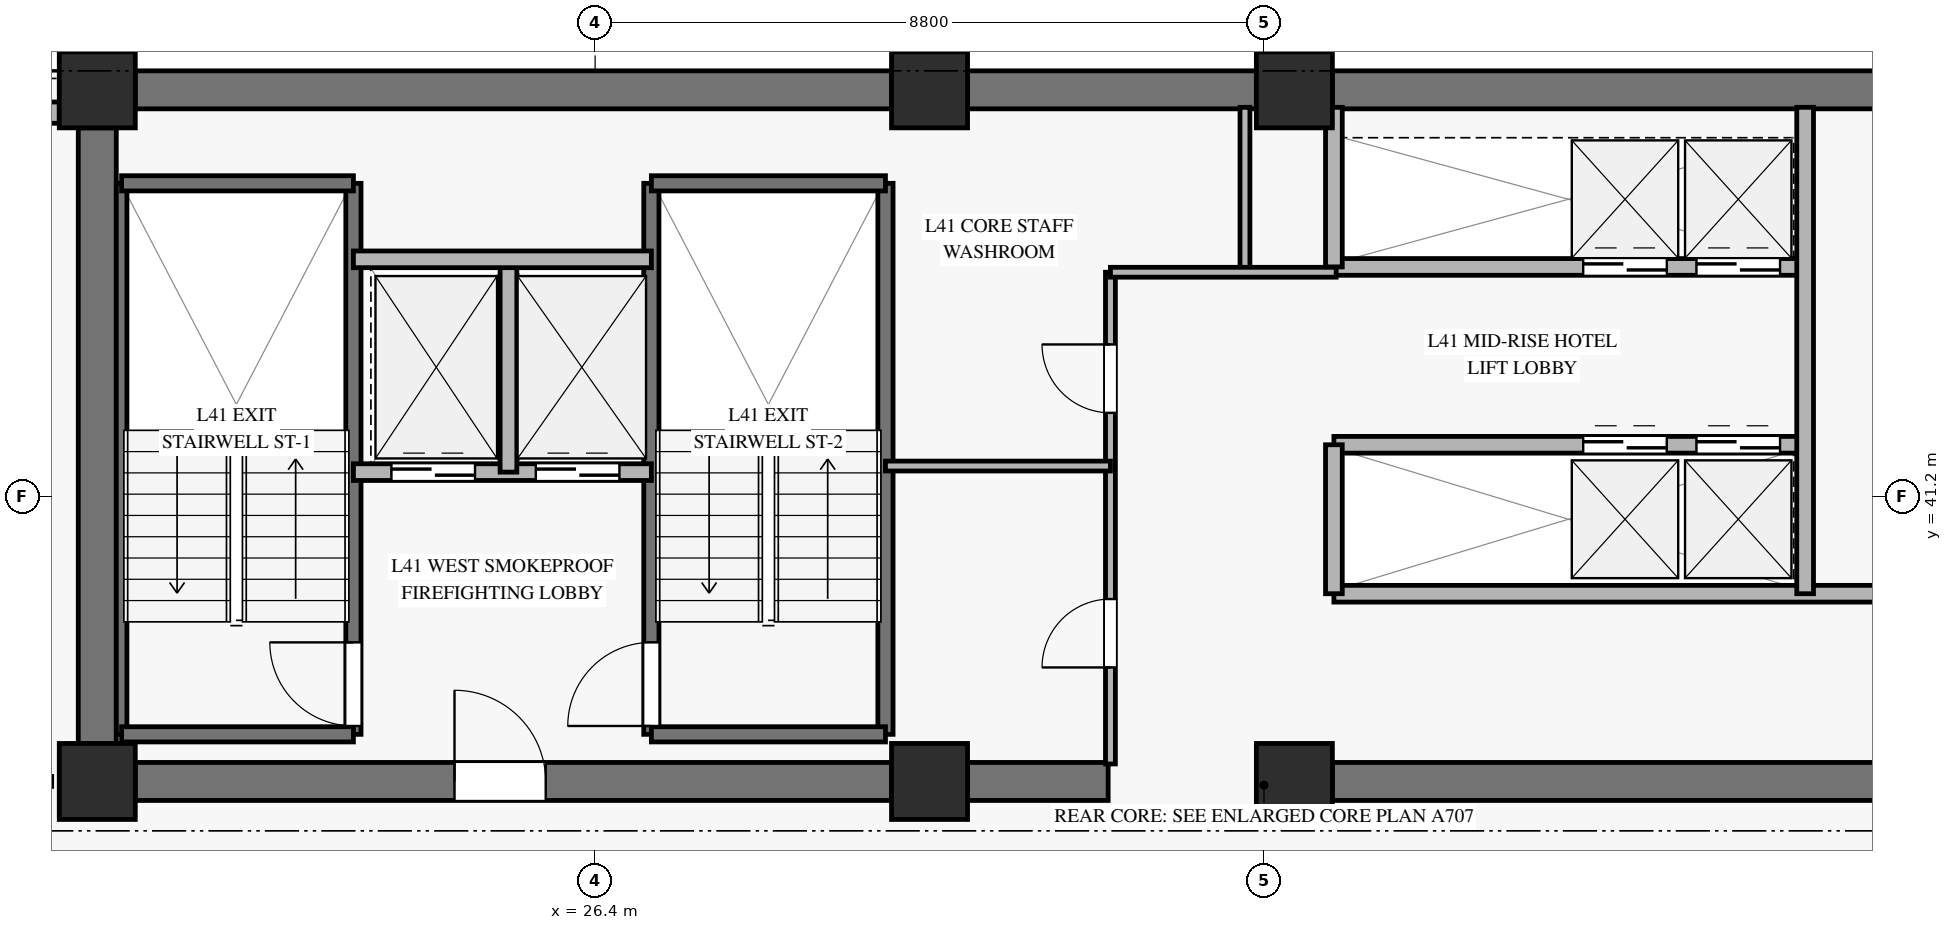
"""IFC4 building model, lengths in metres.
Left out: names, types, materials, properties, quantities, classifications, styles, units other than length and angle.
Written with IfcOpenShell. Run it as: python <this file> out.ifc"""

import sys

from ifc_helpers import new_model, si_unit, direction, frame, frame_2d, origin, origin_2d, place, context, subcontext, project, spatial, rectangle, extrude, source, transform, mapped, element, fill, save


model = new_model("IFC4")
c1 = context("Model", 3, precision=1e-05, world=origin(), true_north=direction((0.0, 1.0)))
c2 = subcontext(c1, "Body", "Model", "MODEL_VIEW")
j1 = project(units=[si_unit("LENGTHUNIT", "METRE"), si_unit("PLANEANGLEUNIT", "RADIAN")], contexts=[c1])
p1 = place(None, origin())
s1 = spatial("IfcSite", under=j1, at=p1, CompositionType="ELEMENT")
p2 = place(p1, origin())
s2 = spatial("IfcBuilding", under=s1, at=p2, CompositionType="ELEMENT")
p3 = place(p2, frame((0.0, 0.0, 166.7)))
s3 = spatial("IfcBuildingStorey", under=s2, at=p3, CompositionType="ELEMENT", Elevation=166.7)
m1 = source(origin(), c2, "Body", "SweptSolid", [
    extrude(rectangle(XDim=1.0, YDim=1.0, at=origin_2d()), origin(), (0.0, 0.0, 1.0), 3.27),
])
for number, where, z_axis, x_axis in (
    (1, (19.85, 37.45, 0.0), (0.0, 0.0, 1.0), (1.0, 0.0, 0.0)),
    (2, (19.85, 46.55, 0.0), (0.0, 0.0, 1.0), (1.0, 0.0, 0.0)),
    (3, (30.8, 37.45, 0.0), (0.0, 0.0, 1.0), (1.0, 0.0, 0.0)),
    (4, (30.8, 46.55, 0.0), (0.0, 0.0, 1.0), (1.0, 0.0, 0.0)),
    (5, (35.6, 37.45, 0.0), (0.0, 0.0, 1.0), (1.0, 0.0, 0.0)),
    (6, (35.6, 46.55, 0.0), (0.0, 0.0, 1.0), (1.0, 0.0, 0.0)),
):
    element("IfcColumn", number, at=place(p3, frame(where, z_axis=z_axis, x_axis=x_axis)), inside=s3, PredefinedType="PILASTER", context=c2, shape_type="MappedRepresentation", body=[
        mapped(m1, transform((0.0, 0.0, 0.0), x_axis=(1.0, 0.0, 0.0), y_axis=(0.0, 1.0, 0.0), z_axis=(0.0, 0.0, 1.0), scale=1.0)),
    ])
p4 = place(p3, frame((20.35, 46.55, 0.0), z_axis=(0.0, 0.0, 1.0), x_axis=(1.0, 0.0, 0.0)))
e7 = element("IfcWall", 7, at=p4, inside=s3, PredefinedType="SHEAR", context=c2, shape_type="SweptSolid", body=[
    extrude(rectangle(XDim=9.95, YDim=0.5, at=frame_2d((4.975, 0.0))), origin(), (0.0, 0.0, 1.0), 3.27),
])
p5 = place(p3, frame((31.3, 46.55, 0.0), z_axis=(0.0, 0.0, 1.0), x_axis=(1.0, 0.0, 0.0)))
e8 = element("IfcWall", 8, at=p5, inside=s3, PredefinedType="SHEAR", context=c2, shape_type="SweptSolid", body=[
    extrude(rectangle(XDim=3.8, YDim=0.5, at=frame_2d((1.9, 0.0))), origin(), (0.0, 0.0, 1.0), 3.27),
])
p6 = place(p3, frame((36.1, 46.55, 0.0), z_axis=(0.0, 0.0, 1.0), x_axis=(1.0, 0.0, 0.0)))
e9 = element("IfcWall", 9, at=p6, inside=s3, PredefinedType="SHEAR", context=c2, shape_type="SweptSolid", body=[
    extrude(rectangle(XDim=7.7, YDim=0.5, at=frame_2d((3.85, 0.0))), origin(), (0.0, 0.0, 1.0), 3.27),
])
p7 = place(p3, frame((20.35, 37.45, 0.0), z_axis=(0.0, 0.0, 1.0), x_axis=(1.0, 0.0, 0.0)))
e10 = element("IfcWall", 10, at=p7, inside=s3, PredefinedType="SHEAR", context=c2, shape_type="SweptSolid", body=[
    extrude(rectangle(XDim=9.95, YDim=0.5, at=frame_2d((4.975, 0.0))), origin(), (0.0, 0.0, 1.0), 3.27),
])
p8 = place(p7, frame((4.2, 0.0, 0.0)))
e11 = element("IfcOpeningElement", 11, at=p8, cuts=e10, PredefinedType="OPENING", context=c2, shape_type="SweptSolid", body=[
    extrude(rectangle(XDim=1.2, YDim=2.15, at=frame_2d((0.6, 1.075))), frame((0.0, 0.26, 0.0), z_axis=(0.0, -1.0, 0.0), x_axis=(1.0, 0.0, 0.0)), (0.0, 0.0, 1.0), 0.52),
])
p9 = place(p3, frame((31.3, 37.45, 0.0), z_axis=(0.0, 0.0, 1.0), x_axis=(1.0, 0.0, 0.0)))
e12 = element("IfcWall", 12, at=p9, inside=s3, PredefinedType="SHEAR", context=c2, shape_type="SweptSolid", body=[
    extrude(rectangle(XDim=1.85, YDim=0.5, at=frame_2d((0.925, 0.0))), origin(), (0.0, 0.0, 1.0), 3.27),
])
p10 = place(p3, frame((36.1, 37.45, 0.0), z_axis=(0.0, 0.0, 1.0), x_axis=(1.0, 0.0, 0.0)))
e13 = element("IfcWall", 13, at=p10, inside=s3, PredefinedType="SHEAR", context=c2, shape_type="SweptSolid", body=[
    extrude(rectangle(XDim=7.7, YDim=0.5, at=frame_2d((3.85, 0.0))), origin(), (0.0, 0.0, 1.0), 3.27),
])
p11 = place(p3, frame((19.85, 37.95, 0.0), z_axis=(0.0, 0.0, 1.0), x_axis=(0.0, 1.0, 0.0)))
e14 = element("IfcWall", 14, at=p11, inside=s3, PredefinedType="SHEAR", context=c2, shape_type="SweptSolid", body=[
    extrude(rectangle(XDim=8.1, YDim=0.5, at=frame_2d((4.05, 0.0))), origin(), (0.0, 0.0, 1.0), 3.27),
])
p12 = place(p3, frame((8.997, 46.25, 0.0), z_axis=(0.0, 0.0, 1.0), x_axis=(1.0, 0.0, 0.0)))
e15 = element("IfcWall", 15, at=p12, inside=s3, PredefinedType="SOLIDWALL", context=c2, shape_type="SweptSolid", body=[
    extrude(rectangle(XDim=10.353, YDim=0.28, at=frame_2d((5.177, 0.0))), origin(), (0.0, 0.0, 1.0), 2.75),
])
p13 = place(p12, frame((4.377, 0.0, 0.45)))
e16 = element("IfcOpeningElement", 16, at=p13, cuts=e15, PredefinedType="OPENING", context=c2, shape_type="SweptSolid", body=[
    extrude(rectangle(XDim=1.6, YDim=2.0, at=frame_2d((0.8, 1.0))), frame((0.0, 0.15, 0.0), z_axis=(0.0, -1.0, 0.0), x_axis=(1.0, 0.0, 0.0)), (0.0, 0.0, 1.0), 0.3),
])
p14 = place(p3, frame((20.17, 38.07, 0.0), z_axis=(0.0, 0.0, 1.0), x_axis=(0.0, 1.0, 0.0)))
e17 = element("IfcWall", 17, at=p14, inside=s3, PredefinedType="SOLIDWALL", context=c2, shape_type="SweptSolid", body=[
    extrude(rectangle(XDim=7.25, YDim=0.14, at=frame_2d((3.625, 0.0))), origin(), (0.0, 0.0, 1.0), 3.5),
])
p15 = place(p3, frame((23.22, 38.07, 0.0), z_axis=(0.0, 0.0, 1.0), x_axis=(0.0, 1.0, 0.0)))
e18 = element("IfcWall", 18, at=p15, inside=s3, PredefinedType="SOLIDWALL", context=c2, shape_type="SweptSolid", body=[
    extrude(rectangle(XDim=7.25, YDim=0.2, at=frame_2d((3.625, 0.0))), origin(), (0.0, 0.0, 1.0), 3.5),
])
p16 = place(p15, frame((0.11, 0.0, 0.0)))
e19 = element("IfcOpeningElement", 19, at=p16, cuts=e18, PredefinedType="OPENING", context=c2, shape_type="SweptSolid", body=[
    extrude(rectangle(XDim=1.1, YDim=2.15, at=frame_2d((0.55, 1.075))), frame((0.0, 0.11, 0.0), z_axis=(0.0, -1.0, 0.0), x_axis=(1.0, 0.0, 0.0)), (0.0, 0.0, 1.0), 0.22),
])
for number, where, z_axis, x_axis in (
    (20, (20.17, 45.32, 0.0), (0.0, 0.0, 1.0), (1.0, 0.0, 0.0)),
    (21, (20.17, 38.07, 0.0), (0.0, 0.0, 1.0), (1.0, 0.0, 0.0)),
):
    element("IfcWall", number, at=place(p3, frame(where, z_axis=z_axis, x_axis=x_axis)), inside=s3, PredefinedType="SOLIDWALL", context=c2, shape_type="SweptSolid", body=[
        extrude(rectangle(XDim=3.05, YDim=0.2, at=frame_2d((1.525, 0.0))), origin(), (0.0, 0.0, 1.0), 3.5),
    ])
p17 = place(p3, frame((27.14, 38.07, 0.0), z_axis=(0.0, 0.0, 1.0), x_axis=(0.0, 1.0, 0.0)))
e22 = element("IfcWall", 22, at=p17, inside=s3, PredefinedType="SOLIDWALL", context=c2, shape_type="SweptSolid", body=[
    extrude(rectangle(XDim=7.25, YDim=0.2, at=frame_2d((3.625, 0.0))), origin(), (0.0, 0.0, 1.0), 3.5),
])
p18 = place(p17, frame((0.11, 0.0, 0.0)))
e23 = element("IfcOpeningElement", 23, at=p18, cuts=e22, PredefinedType="OPENING", context=c2, shape_type="SweptSolid", body=[
    extrude(rectangle(XDim=1.1, YDim=2.15, at=frame_2d((0.55, 1.075))), frame((0.0, 0.11, 0.0), z_axis=(0.0, -1.0, 0.0), x_axis=(1.0, 0.0, 0.0)), (0.0, 0.0, 1.0), 0.22),
])
p19 = place(p3, frame((30.22, 38.07, 0.0), z_axis=(0.0, 0.0, 1.0), x_axis=(0.0, 1.0, 0.0)))
e24 = element("IfcWall", 24, at=p19, inside=s3, PredefinedType="SOLIDWALL", context=c2, shape_type="SweptSolid", body=[
    extrude(rectangle(XDim=7.25, YDim=0.2, at=frame_2d((3.625, 0.0))), origin(), (0.0, 0.0, 1.0), 3.5),
])
for number, where, z_axis, x_axis in (
    (25, (27.14, 45.32, 0.0), (0.0, 0.0, 1.0), (1.0, 0.0, 0.0)),
    (26, (27.14, 38.07, 0.0), (0.0, 0.0, 1.0), (1.0, 0.0, 0.0)),
):
    element("IfcWall", number, at=place(p3, frame(where, z_axis=z_axis, x_axis=x_axis)), inside=s3, PredefinedType="SOLIDWALL", context=c2, shape_type="SweptSolid", body=[
        extrude(rectangle(XDim=3.08, YDim=0.2, at=frame_2d((1.54, 0.0))), origin(), (0.0, 0.0, 1.0), 3.5),
    ])
p20 = place(p3, frame((23.22, 41.52, 0.0), z_axis=(0.0, 0.0, 1.0), x_axis=(1.0, 0.0, 0.0)))
e27 = element("IfcWall", 27, at=p20, inside=s3, PredefinedType="SOLIDWALL", context=c2, shape_type="SweptSolid", body=[
    extrude(rectangle(XDim=3.92, YDim=0.22, at=frame_2d((1.96, 0.0))), origin(), (0.0, 0.0, 1.0), 3.27),
])
p21 = place(p20, frame((0.5, 0.0, 0.0)))
e28 = element("IfcOpeningElement", 28, at=p21, cuts=e27, PredefinedType="OPENING", context=c2, shape_type="SweptSolid", body=[
    extrude(rectangle(XDim=1.1, YDim=2.2, at=frame_2d((0.55, 1.1))), frame((0.0, 0.12, 0.0), z_axis=(0.0, -1.0, 0.0), x_axis=(1.0, 0.0, 0.0)), (0.0, 0.0, 1.0), 0.24),
])
p22 = place(p20, frame((2.4, 0.0, 0.0)))
e29 = element("IfcOpeningElement", 29, at=p22, cuts=e27, PredefinedType="OPENING", context=c2, shape_type="SweptSolid", body=[
    extrude(rectangle(XDim=1.1, YDim=2.2, at=frame_2d((0.55, 1.1))), frame((0.0, 0.12, 0.0), z_axis=(0.0, -1.0, 0.0), x_axis=(1.0, 0.0, 0.0)), (0.0, 0.0, 1.0), 0.24),
])
p23 = place(p3, frame((25.26, 41.52, 0.0), z_axis=(0.0, 0.0, 1.0), x_axis=(0.0, 1.0, 0.0)))
e30 = element("IfcWall", 30, at=p23, inside=s3, PredefinedType="SOLIDWALL", context=c2, shape_type="SweptSolid", body=[
    extrude(rectangle(XDim=2.8, YDim=0.22, at=frame_2d((1.4, 0.0))), origin(), (0.0, 0.0, 1.0), 3.27),
])
p24 = place(p3, frame((23.22, 44.32, 0.0), z_axis=(0.0, 0.0, 1.0), x_axis=(1.0, 0.0, 0.0)))
e31 = element("IfcWall", 31, at=p24, inside=s3, PredefinedType="SOLIDWALL", context=c2, shape_type="SweptSolid", body=[
    extrude(rectangle(XDim=3.92, YDim=0.22, at=frame_2d((1.96, 0.0))), origin(), (0.0, 0.0, 1.0), 3.27),
])
p25 = place(p3, frame((36.12, 44.22, 0.0), z_axis=(0.0, 0.0, 1.0), x_axis=(1.0, 0.0, 0.0)))
e32 = element("IfcWall", 32, at=p25, inside=s3, PredefinedType="SOLIDWALL", context=c2, shape_type="SweptSolid", body=[
    extrude(rectangle(XDim=6.2, YDim=0.22, at=frame_2d((3.1, 0.0))), origin(), (0.0, 0.0, 1.0), 3.27),
])
p26 = place(p25, frame((3.28, 0.0, 0.0)))
e33 = element("IfcOpeningElement", 33, at=p26, cuts=e32, PredefinedType="OPENING", context=c2, shape_type="SweptSolid", body=[
    extrude(rectangle(XDim=1.1, YDim=2.2, at=frame_2d((0.55, 1.1))), frame((0.0, 0.12, 0.0), z_axis=(0.0, -1.0, 0.0), x_axis=(1.0, 0.0, 0.0)), (0.0, 0.0, 1.0), 0.24),
])
p27 = place(p25, frame((4.77, 0.0, 0.0)))
e34 = element("IfcOpeningElement", 34, at=p27, cuts=e32, PredefinedType="OPENING", context=c2, shape_type="SweptSolid", body=[
    extrude(rectangle(XDim=1.1, YDim=2.2, at=frame_2d((0.55, 1.1))), frame((0.0, 0.12, 0.0), z_axis=(0.0, -1.0, 0.0), x_axis=(1.0, 0.0, 0.0)), (0.0, 0.0, 1.0), 0.24),
])
p28 = place(p3, frame((36.12, 41.88, 0.0), z_axis=(0.0, 0.0, 1.0), x_axis=(1.0, 0.0, 0.0)))
e35 = element("IfcWall", 35, at=p28, inside=s3, PredefinedType="SOLIDWALL", context=c2, shape_type="SweptSolid", body=[
    extrude(rectangle(XDim=6.2, YDim=0.22, at=frame_2d((3.1, 0.0))), origin(), (0.0, 0.0, 1.0), 3.27),
])
p29 = place(p28, frame((3.28, 0.0, 0.0)))
e36 = element("IfcOpeningElement", 36, at=p29, cuts=e35, PredefinedType="OPENING", context=c2, shape_type="SweptSolid", body=[
    extrude(rectangle(XDim=1.1, YDim=2.2, at=frame_2d((0.55, 1.1))), frame((0.0, 0.12, 0.0), z_axis=(0.0, -1.0, 0.0), x_axis=(1.0, 0.0, 0.0)), (0.0, 0.0, 1.0), 0.24),
])
p30 = place(p28, frame((4.77, 0.0, 0.0)))
e37 = element("IfcOpeningElement", 37, at=p30, cuts=e35, PredefinedType="OPENING", context=c2, shape_type="SweptSolid", body=[
    extrude(rectangle(XDim=1.1, YDim=2.2, at=frame_2d((0.55, 1.1))), frame((0.0, 0.12, 0.0), z_axis=(0.0, -1.0, 0.0), x_axis=(1.0, 0.0, 0.0)), (0.0, 0.0, 1.0), 0.24),
])
p31 = place(p3, frame((36.12, 39.92, 0.0), z_axis=(0.0, 0.0, 1.0), x_axis=(1.0, 0.0, 0.0)))
e38 = element("IfcWall", 38, at=p31, inside=s3, PredefinedType="SOLIDWALL", context=c2, shape_type="SweptSolid", body=[
    extrude(rectangle(XDim=8.6, YDim=0.22, at=frame_2d((4.3, 0.0))), origin(), (0.0, 0.0, 1.0), 2.555),
])
p32 = place(p3, frame((42.32, 39.92, 0.0), z_axis=(0.0, 0.0, 1.0), x_axis=(0.0, 1.0, 0.0)))
e39 = element("IfcWall", 39, at=p32, inside=s3, PredefinedType="SOLIDWALL", context=c2, shape_type="SweptSolid", body=[
    extrude(rectangle(XDim=6.4, YDim=0.22, at=frame_2d((3.2, 0.0))), origin(), (0.0, 0.0, 1.0), 3.27),
])
p33 = place(p3, frame((36.12, 39.92, 0.0), z_axis=(0.0, 0.0, 1.0), x_axis=(0.0, 1.0, 0.0)))
e40 = element("IfcWall", 40, at=p33, inside=s3, PredefinedType="SOLIDWALL", context=c2, shape_type="SweptSolid", body=[
    extrude(rectangle(XDim=1.96, YDim=0.22, at=frame_2d((0.98, 0.0))), origin(), (0.0, 0.0, 1.0), 3.27),
])
p34 = place(p3, frame((36.12, 44.22, 0.0), z_axis=(0.0, 0.0, 1.0), x_axis=(0.0, 1.0, 0.0)))
e41 = element("IfcWall", 41, at=p34, inside=s3, PredefinedType="SOLIDWALL", context=c2, shape_type="SweptSolid", body=[
    extrude(rectangle(XDim=2.1, YDim=0.22, at=frame_2d((1.05, 0.0))), origin(), (0.0, 0.0, 1.0), 3.27),
])
p35 = place(p3, frame((33.18, 37.68, 0.0), z_axis=(0.0, 0.0, 1.0), x_axis=(0.0, 1.0, 0.0)))
e42 = element("IfcWall", 42, at=p35, inside=s3, PredefinedType="PARTITIONING", context=c2, shape_type="SweptSolid", body=[
    extrude(rectangle(XDim=6.47, YDim=0.13, at=frame_2d((3.235, 0.0))), origin(), (0.0, 0.0, 1.0), 2.355),
])
p36 = place(p35, frame((1.27, 0.0, 0.0)))
e43 = element("IfcOpeningElement", 43, at=p36, cuts=e42, PredefinedType="OPENING", context=c2, shape_type="SweptSolid", body=[
    extrude(rectangle(XDim=0.9, YDim=2.1, at=frame_2d((0.45, 1.05))), frame((0.0, 0.075, 0.0), z_axis=(0.0, -1.0, 0.0), x_axis=(1.0, 0.0, 0.0)), (0.0, 0.0, 1.0), 0.15),
])
p37 = place(p35, frame((4.62, 0.0, 0.0)))
e44 = element("IfcOpeningElement", 44, at=p37, cuts=e42, PredefinedType="OPENING", context=c2, shape_type="SweptSolid", body=[
    extrude(rectangle(XDim=0.9, YDim=2.1, at=frame_2d((0.45, 1.05))), frame((0.0, 0.075, 0.0), z_axis=(0.0, -1.0, 0.0), x_axis=(1.0, 0.0, 0.0)), (0.0, 0.0, 1.0), 0.15),
])
p38 = place(p3, frame((34.95, 44.15, 0.0), z_axis=(0.0, 0.0, 1.0), x_axis=(0.0, 1.0, 0.0)))
e45 = element("IfcWall", 45, at=p38, inside=s3, PredefinedType="PARTITIONING", context=c2, shape_type="SweptSolid", body=[
    extrude(rectangle(XDim=2.17, YDim=0.13, at=frame_2d((1.085, 0.0))), origin(), (0.0, 0.0, 1.0), 3.27),
])
p39 = place(p3, frame((33.18, 44.15, 0.0), z_axis=(0.0, 0.0, 1.0), x_axis=(1.0, 0.0, 0.0)))
e46 = element("IfcWall", 46, at=p39, inside=s3, PredefinedType="PARTITIONING", context=c2, shape_type="SweptSolid", body=[
    extrude(rectangle(XDim=2.97, YDim=0.13, at=frame_2d((1.485, 0.0))), origin(), (0.0, 0.0, 1.0), 2.555),
])
p40 = place(p3, frame((30.22, 41.6, 0.0), z_axis=(0.0, 0.0, 1.0), x_axis=(1.0, 0.0, 0.0)))
e47 = element("IfcWall", 47, at=p40, inside=s3, PredefinedType="PARTITIONING", context=c2, shape_type="SweptSolid", body=[
    extrude(rectangle(XDim=2.96, YDim=0.13, at=frame_2d((1.48, 0.0))), origin(), (0.0, 0.0, 1.0), 2.555),
])
m2 = source(origin(), c2, "Body", "SweptSolid", [
    extrude(rectangle(XDim=1.1, YDim=2.15, at=frame_2d((0.55, 1.075))), frame((0.0, 0.025, 0.0), z_axis=(0.0, -1.0, 0.0), x_axis=(1.0, 0.0, 0.0)), (0.0, 0.0, 1.0), 0.05),
])
p41 = place(p16, origin())
e48 = element("IfcDoor", 48, at=p41, inside=s3, OperationType="SINGLE_SWING_RIGHT", PredefinedType="DOOR", context=c2, shape_type="MappedRepresentation", body=[
    mapped(m2, transform((0.0, 0.0, 0.0), x_axis=(1.0, 0.0, 0.0), y_axis=(0.0, 1.0, 0.0), z_axis=(0.0, 0.0, 1.0), scale=1.0)),
])
fill(e19, e48)
p42 = place(p18, origin())
e49 = element("IfcDoor", 49, at=p42, inside=s3, OperationType="SINGLE_SWING_LEFT", PredefinedType="DOOR", context=c2, shape_type="MappedRepresentation", body=[
    mapped(m2, transform((0.0, 0.0, 0.0), x_axis=(1.0, 0.0, 0.0), y_axis=(0.0, 1.0, 0.0), z_axis=(0.0, 0.0, 1.0), scale=1.0)),
])
fill(e23, e49)
m3 = source(origin(), c2, "Body", "SweptSolid", [
    extrude(rectangle(XDim=1.1, YDim=2.2, at=frame_2d((0.55, 1.1))), frame((0.0, 0.025, 0.0), z_axis=(0.0, -1.0, 0.0), x_axis=(1.0, 0.0, 0.0)), (0.0, 0.0, 1.0), 0.05),
])
p43 = place(p21, origin())
e50 = element("IfcDoor", 50, at=p43, inside=s3, OperationType="SLIDING_TO_LEFT", PredefinedType="DOOR", context=c2, shape_type="MappedRepresentation", body=[
    mapped(m3, transform((0.0, 0.0, 0.0), x_axis=(1.0, 0.0, 0.0), y_axis=(0.0, 1.0, 0.0), z_axis=(0.0, 0.0, 1.0), scale=1.0)),
])
fill(e28, e50)
p44 = place(p22, origin())
e51 = element("IfcDoor", 51, at=p44, inside=s3, OperationType="SLIDING_TO_LEFT", PredefinedType="DOOR", context=c2, shape_type="MappedRepresentation", body=[
    mapped(m3, transform((0.0, 0.0, 0.0), x_axis=(1.0, 0.0, 0.0), y_axis=(0.0, 1.0, 0.0), z_axis=(0.0, 0.0, 1.0), scale=1.0)),
])
fill(e29, e51)
m4 = source(origin(), c2, "Body", "SweptSolid", [
    extrude(rectangle(XDim=1.2, YDim=2.15, at=frame_2d((0.6, 1.075))), frame((0.0, 0.025, 0.0), z_axis=(0.0, -1.0, 0.0), x_axis=(1.0, 0.0, 0.0)), (0.0, 0.0, 1.0), 0.05),
])
p45 = place(p8, origin())
e52 = element("IfcDoor", 52, at=p45, inside=s3, OperationType="SINGLE_SWING_LEFT", PredefinedType="DOOR", context=c2, shape_type="MappedRepresentation", body=[
    mapped(m4, transform((0.0, 0.0, 0.0), x_axis=(1.0, 0.0, 0.0), y_axis=(0.0, 1.0, 0.0), z_axis=(0.0, 0.0, 1.0), scale=1.0)),
])
fill(e11, e52)
p46 = place(p26, origin())
e53 = element("IfcDoor", 53, at=p46, inside=s3, OperationType="SLIDING_TO_LEFT", PredefinedType="DOOR", context=c2, shape_type="MappedRepresentation", body=[
    mapped(m3, transform((0.0, 0.0, 0.0), x_axis=(1.0, 0.0, 0.0), y_axis=(0.0, 1.0, 0.0), z_axis=(0.0, 0.0, 1.0), scale=1.0)),
])
fill(e33, e53)
p47 = place(p27, origin())
e54 = element("IfcDoor", 54, at=p47, inside=s3, OperationType="SLIDING_TO_LEFT", PredefinedType="DOOR", context=c2, shape_type="MappedRepresentation", body=[
    mapped(m3, transform((0.0, 0.0, 0.0), x_axis=(1.0, 0.0, 0.0), y_axis=(0.0, 1.0, 0.0), z_axis=(0.0, 0.0, 1.0), scale=1.0)),
])
fill(e34, e54)
p48 = place(p29, origin())
e55 = element("IfcDoor", 55, at=p48, inside=s3, OperationType="SLIDING_TO_LEFT", PredefinedType="DOOR", context=c2, shape_type="MappedRepresentation", body=[
    mapped(m3, transform((0.0, 0.0, 0.0), x_axis=(1.0, 0.0, 0.0), y_axis=(0.0, 1.0, 0.0), z_axis=(0.0, 0.0, 1.0), scale=1.0)),
])
fill(e36, e55)
p49 = place(p30, origin())
e56 = element("IfcDoor", 56, at=p49, inside=s3, OperationType="SLIDING_TO_LEFT", PredefinedType="DOOR", context=c2, shape_type="MappedRepresentation", body=[
    mapped(m3, transform((0.0, 0.0, 0.0), x_axis=(1.0, 0.0, 0.0), y_axis=(0.0, 1.0, 0.0), z_axis=(0.0, 0.0, 1.0), scale=1.0)),
])
fill(e37, e56)
m5 = source(origin(), c2, "Body", "SweptSolid", [
    extrude(rectangle(XDim=0.9, YDim=2.1, at=frame_2d((0.45, 1.05))), frame((0.0, 0.025, 0.0), z_axis=(0.0, -1.0, 0.0), x_axis=(1.0, 0.0, 0.0)), (0.0, 0.0, 1.0), 0.05),
])
p50 = place(p36, origin())
e57 = element("IfcDoor", 57, at=p50, inside=s3, OperationType="SINGLE_SWING_LEFT", PredefinedType="DOOR", context=c2, shape_type="MappedRepresentation", body=[
    mapped(m5, transform((0.0, 0.0, 0.0), x_axis=(1.0, 0.0, 0.0), y_axis=(0.0, 1.0, 0.0), z_axis=(0.0, 0.0, 1.0), scale=1.0)),
])
fill(e43, e57)
p51 = place(p37, origin())
e58 = element("IfcDoor", 58, at=p51, inside=s3, OperationType="SINGLE_SWING_RIGHT", PredefinedType="DOOR", context=c2, shape_type="MappedRepresentation", body=[
    mapped(m5, transform((0.0, 0.0, 0.0), x_axis=(1.0, 0.0, 0.0), y_axis=(0.0, 1.0, 0.0), z_axis=(0.0, 0.0, 1.0), scale=1.0)),
])
fill(e44, e58)
save(model, sys.argv[1])
